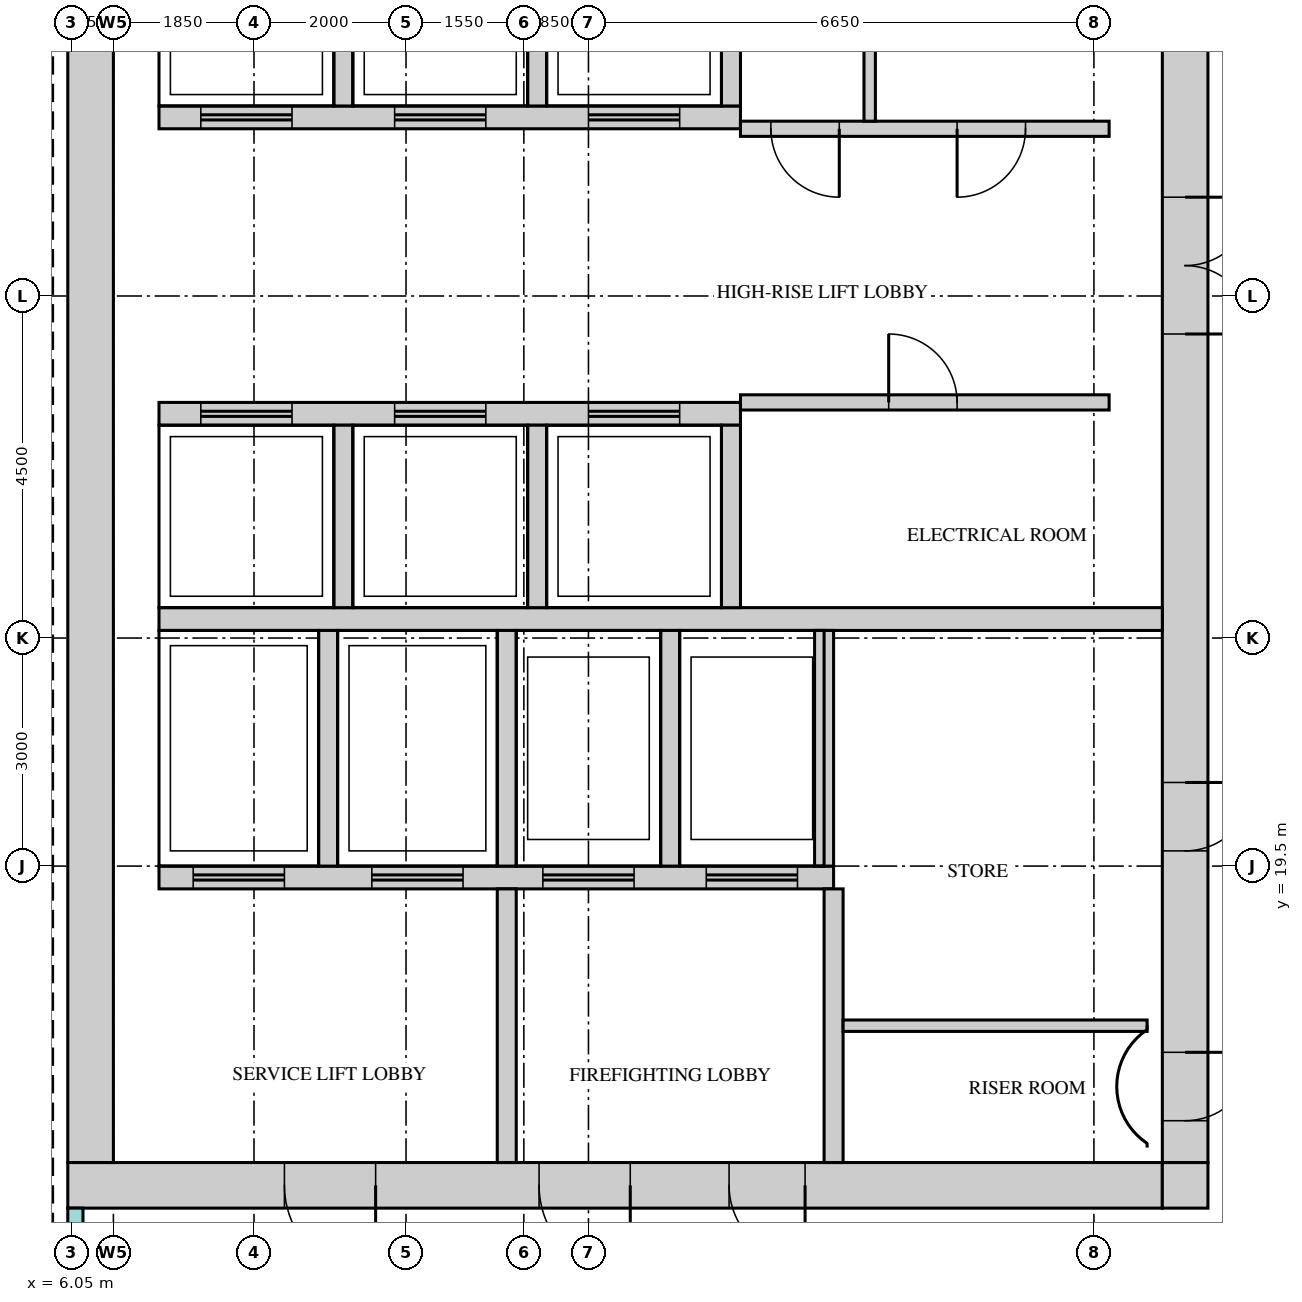
"""IFC4 building model, lengths in metres.
Left out: names, types, materials, properties, quantities, classifications, styles, units other than length and angle.
Written with IfcOpenShell. Run it as: python <this file> out.ifc"""

import sys

from ifc_helpers import new_model, si_unit, direction, frame, frame_2d, origin, place, context, subcontext, project, spatial, rectangle, extrude, source, transform, mapped, element, fill, save


model = new_model("IFC4")
c1 = context("Model", 3, precision=1e-05, world=origin(), true_north=direction((0.0, 1.0)))
c2 = subcontext(c1, "Body", "Model", "MODEL_VIEW")
j1 = project(units=[si_unit("LENGTHUNIT", "METRE"), si_unit("PLANEANGLEUNIT", "RADIAN")], contexts=[c1])
p1 = place(None, origin())
s1 = spatial("IfcSite", under=j1, at=p1, CompositionType="ELEMENT")
p2 = place(p1, origin())
s2 = spatial("IfcBuilding", under=s1, at=p2, CompositionType="ELEMENT")
p3 = place(p2, frame((0.0, 0.0, 322.2)))
s3 = spatial("IfcBuildingStorey", under=s2, at=p3, CompositionType="ELEMENT", Elevation=322.2)
m1 = source(origin(), c2, "Body", "SweptSolid", [
    extrude(rectangle(XDim=14.4, YDim=0.6, at=frame_2d((7.2, 0.0))), origin(), (0.0, 0.0, 1.0), 3.75),
])
p4 = place(p3, frame((6.0, 15.3, 0.0), z_axis=(0.0, 0.0, 1.0), x_axis=(1.0, 0.0, 0.0)))
e1 = element("IfcWall", 1, at=p4, inside=s3, PredefinedType="SHEAR", context=c2, shape_type="MappedRepresentation", body=[
    mapped(m1, transform((0.0, 0.0, 0.0))),
])
m2 = source(origin(), c2, "Body", "SweptSolid", [
    extrude(rectangle(XDim=1.2, YDim=2.1, at=frame_2d((0.6, 1.05))), frame((0.0, 0.31, 0.0), z_axis=(0.0, -1.0, 0.0), x_axis=(1.0, 0.0, 0.0)), (0.0, 0.0, 1.0), 0.62),
])
p5 = place(p4, frame((6.2, 0.0, 0.0)))
e2 = element("IfcOpeningElement", 2, at=p5, cuts=e1, PredefinedType="OPENING", context=c2, shape_type="MappedRepresentation", body=[
    mapped(m2, transform((0.0, 0.0, 0.0))),
])
p6 = place(p4, frame((2.85, 0.0, 0.0)))
e3 = element("IfcOpeningElement", 3, at=p6, cuts=e1, PredefinedType="OPENING", context=c2, shape_type="MappedRepresentation", body=[
    mapped(m2, transform((0.0, 0.0, 0.0))),
])
m3 = source(origin(), c2, "Body", "SweptSolid", [
    extrude(rectangle(XDim=1.0, YDim=2.1, at=frame_2d((0.5, 1.05))), frame((0.0, 0.31, 0.0), z_axis=(0.0, -1.0, 0.0), x_axis=(1.0, 0.0, 0.0)), (0.0, 0.0, 1.0), 0.62),
])
p7 = place(p4, frame((8.7, 0.0, 0.0)))
e4 = element("IfcOpeningElement", 4, at=p7, cuts=e1, PredefinedType="OPENING", context=c2, shape_type="MappedRepresentation", body=[
    mapped(m3, transform((0.0, 0.0, 0.0))),
])
m4 = source(origin(), c2, "Body", "SweptSolid", [
    extrude(rectangle(XDim=0.6, YDim=0.6, at=frame_2d((0.3, 0.0))), origin(), (0.0, 0.0, 1.0), 3.75),
])
p8 = place(p3, frame((20.4, 15.3, 0.0), z_axis=(0.0, 0.0, 1.0), x_axis=(1.0, 0.0, 0.0)))
e5 = element("IfcWall", 5, at=p8, inside=s3, PredefinedType="SHEAR", context=c2, shape_type="MappedRepresentation", body=[
    mapped(m4, transform((0.0, 0.0, 0.0))),
])
m5 = source(origin(), c2, "Body", "SweptSolid", [
    extrude(rectangle(XDim=22.8, YDim=0.6, at=frame_2d((11.4, 0.0))), origin(), (0.0, 0.0, 1.0), 3.75),
])
p9 = place(p3, frame((20.7, 15.6, 0.0), z_axis=(0.0, 0.0, 1.0), x_axis=(0.0, 1.0, 0.0)))
e6 = element("IfcWall", 6, at=p9, inside=s3, PredefinedType="SHEAR", context=c2, shape_type="MappedRepresentation", body=[
    mapped(m5, transform((0.0, 0.0, 0.0))),
])
m6 = source(origin(), c2, "Body", "SweptSolid", [
    extrude(rectangle(XDim=1.8, YDim=2.1, at=frame_2d((0.9, 1.05))), frame((0.0, 0.31, 0.0), z_axis=(0.0, -1.0, 0.0), x_axis=(1.0, 0.0, 0.0)), (0.0, 0.0, 1.0), 0.62),
])
p10 = place(p9, frame((10.9, 0.0, 0.0)))
e7 = element("IfcOpeningElement", 7, at=p10, cuts=e6, PredefinedType="OPENING", context=c2, shape_type="MappedRepresentation", body=[
    mapped(m6, transform((0.0, 0.0, 0.0))),
])
m7 = source(origin(), c2, "Body", "SweptSolid", [
    extrude(rectangle(XDim=0.9, YDim=2.1, at=frame_2d((0.45, 1.05))), frame((0.0, 0.31, 0.0), z_axis=(0.0, -1.0, 0.0), x_axis=(1.0, 0.0, 0.0)), (0.0, 0.0, 1.0), 0.62),
])
p11 = place(p9, frame((0.55, 0.0, 0.0)))
e8 = element("IfcOpeningElement", 8, at=p11, cuts=e6, PredefinedType="OPENING", context=c2, shape_type="MappedRepresentation", body=[
    mapped(m7, transform((0.0, 0.0, 0.0))),
])
p12 = place(p9, frame((4.1, 0.0, 0.0)))
e9 = element("IfcOpeningElement", 9, at=p12, cuts=e6, PredefinedType="OPENING", context=c2, shape_type="MappedRepresentation", body=[
    mapped(m7, transform((0.0, 0.0, 0.0))),
])
p13 = place(p3, frame((6.3, 15.6, 0.0), z_axis=(0.0, 0.0, 1.0), x_axis=(0.0, 1.0, 0.0)))
e10 = element("IfcWall", 10, at=p13, inside=s3, PredefinedType="SHEAR", context=c2, shape_type="MappedRepresentation", body=[
    mapped(m5, transform((0.0, 0.0, 0.0))),
])
m8 = source(origin(), c2, "Body", "SweptSolid", [
    extrude(rectangle(XDim=13.2, YDim=0.3, at=frame_2d((6.6, 0.0))), origin(), (0.0, 0.0, 1.0), 3.75),
])
p14 = place(p3, frame((7.2, 22.75, 0.0), z_axis=(0.0, 0.0, 1.0), x_axis=(1.0, 0.0, 0.0)))
e11 = element("IfcWall", 11, at=p14, inside=s3, PredefinedType="STANDARD", context=c2, shape_type="MappedRepresentation", body=[
    mapped(m8, transform((0.0, 0.0, 0.0))),
])
m9 = source(origin(), c2, "Body", "SweptSolid", [
    extrude(rectangle(XDim=8.875, YDim=0.3, at=frame_2d((4.438, 0.0))), origin(), (0.0, 0.0, 1.0), 3.75),
])
p15 = place(p3, frame((7.2, 19.35, 0.0), z_axis=(0.0, 0.0, 1.0), x_axis=(1.0, 0.0, 0.0)))
e12 = element("IfcWall", 12, at=p15, inside=s3, PredefinedType="STANDARD", context=c2, shape_type="MappedRepresentation", body=[
    mapped(m9, transform((0.0, 0.0, 0.0))),
])
m10 = source(origin(), c2, "Body", "SweptSolid", [
    extrude(rectangle(XDim=1.2, YDim=2.1, at=frame_2d((0.6, 1.05))), frame((0.0, 0.16, 0.0), z_axis=(0.0, -1.0, 0.0), x_axis=(1.0, 0.0, 0.0)), (0.0, 0.0, 1.0), 0.32),
])
p16 = place(p15, frame((0.45, 0.0, 0.0)))
e13 = element("IfcOpeningElement", 13, at=p16, cuts=e12, PredefinedType="OPENING", context=c2, shape_type="MappedRepresentation", body=[
    mapped(m10, transform((0.0, 0.0, 0.0))),
])
p17 = place(p15, frame((2.8, 0.0, 0.0)))
e14 = element("IfcOpeningElement", 14, at=p17, cuts=e12, PredefinedType="OPENING", context=c2, shape_type="MappedRepresentation", body=[
    mapped(m10, transform((0.0, 0.0, 0.0))),
])
p18 = place(p15, frame((5.05, 0.0, 0.0)))
e15 = element("IfcOpeningElement", 15, at=p18, cuts=e12, PredefinedType="OPENING", context=c2, shape_type="MappedRepresentation", body=[
    mapped(m10, transform((0.0, 0.0, 0.0))),
])
p19 = place(p15, frame((7.2, 0.0, 0.0)))
e16 = element("IfcOpeningElement", 16, at=p19, cuts=e12, PredefinedType="OPENING", context=c2, shape_type="MappedRepresentation", body=[
    mapped(m10, transform((0.0, 0.0, 0.0))),
])
m11 = source(origin(), c2, "Body", "SweptSolid", [
    extrude(rectangle(XDim=7.65, YDim=0.3, at=frame_2d((3.825, 0.0))), origin(), (0.0, 0.0, 1.0), 3.75),
])
p20 = place(p3, frame((7.2, 29.35, 0.0), z_axis=(0.0, 0.0, 1.0), x_axis=(1.0, 0.0, 0.0)))
e17 = element("IfcWall", 17, at=p20, inside=s3, PredefinedType="STANDARD", context=c2, shape_type="MappedRepresentation", body=[
    mapped(m11, transform((0.0, 0.0, 0.0))),
])
p21 = place(p20, frame((0.55, 0.0, 0.0)))
e18 = element("IfcOpeningElement", 18, at=p21, cuts=e17, PredefinedType="OPENING", context=c2, shape_type="MappedRepresentation", body=[
    mapped(m10, transform((0.0, 0.0, 0.0))),
])
p22 = place(p20, frame((3.1, 0.0, 0.0)))
e19 = element("IfcOpeningElement", 19, at=p22, cuts=e17, PredefinedType="OPENING", context=c2, shape_type="MappedRepresentation", body=[
    mapped(m10, transform((0.0, 0.0, 0.0))),
])
p23 = place(p20, frame((5.65, 0.0, 0.0)))
e20 = element("IfcOpeningElement", 20, at=p23, cuts=e17, PredefinedType="OPENING", context=c2, shape_type="MappedRepresentation", body=[
    mapped(m10, transform((0.0, 0.0, 0.0))),
])
p24 = place(p3, frame((7.2, 25.45, 0.0), z_axis=(0.0, 0.0, 1.0), x_axis=(1.0, 0.0, 0.0)))
e21 = element("IfcWall", 21, at=p24, inside=s3, PredefinedType="STANDARD", context=c2, shape_type="MappedRepresentation", body=[
    mapped(m11, transform((0.0, 0.0, 0.0))),
])
p25 = place(p24, frame((0.55, 0.0, 0.0)))
e22 = element("IfcOpeningElement", 22, at=p25, cuts=e21, PredefinedType="OPENING", context=c2, shape_type="MappedRepresentation", body=[
    mapped(m10, transform((0.0, 0.0, 0.0))),
])
p26 = place(p24, frame((3.1, 0.0, 0.0)))
e23 = element("IfcOpeningElement", 23, at=p26, cuts=e21, PredefinedType="OPENING", context=c2, shape_type="MappedRepresentation", body=[
    mapped(m10, transform((0.0, 0.0, 0.0))),
])
p27 = place(p24, frame((5.65, 0.0, 0.0)))
e24 = element("IfcOpeningElement", 24, at=p27, cuts=e21, PredefinedType="OPENING", context=c2, shape_type="MappedRepresentation", body=[
    mapped(m10, transform((0.0, 0.0, 0.0))),
])
m12 = source(origin(), c2, "Body", "SweptSolid", [
    extrude(rectangle(XDim=3.1, YDim=0.25, at=frame_2d((1.55, 0.0))), origin(), (0.0, 0.0, 1.0), 3.75),
])
for number, where, z_axis, x_axis in (
    (25, (9.425, 19.5, 0.0), (0.0, 0.0, 1.0), (0.0, 1.0, 0.0)),
    (26, (11.775, 19.5, 0.0), (0.0, 0.0, 1.0), (0.0, 1.0, 0.0)),
    (27, (13.925, 19.5, 0.0), (0.0, 0.0, 1.0), (0.0, 1.0, 0.0)),
    (28, (15.95, 19.5, 0.0), (0.0, 0.0, 1.0), (0.0, 1.0, 0.0)),
):
    element("IfcWall", number, at=place(p3, frame(where, z_axis=z_axis, x_axis=x_axis)), inside=s3, PredefinedType="STANDARD", context=c2, shape_type="MappedRepresentation", body=[
        mapped(m12, transform((0.0, 0.0, 0.0))),
    ])
m13 = source(origin(), c2, "Body", "SweptSolid", [
    extrude(rectangle(XDim=2.4, YDim=0.25, at=frame_2d((1.2, 0.0))), origin(), (0.0, 0.0, 1.0), 3.75),
])
for number, where, z_axis, x_axis in (
    (29, (9.625, 29.5, 0.0), (0.0, 0.0, 1.0), (0.0, 1.0, 0.0)),
    (30, (12.175, 29.5, 0.0), (0.0, 0.0, 1.0), (0.0, 1.0, 0.0)),
    (31, (14.725, 29.5, 0.0), (0.0, 0.0, 1.0), (0.0, 1.0, 0.0)),
):
    element("IfcWall", number, at=place(p3, frame(where, z_axis=z_axis, x_axis=x_axis)), inside=s3, PredefinedType="STANDARD", context=c2, shape_type="MappedRepresentation", body=[
        mapped(m13, transform((0.0, 0.0, 0.0))),
    ])
m14 = source(origin(), c2, "Body", "SweptSolid", [
    extrude(rectangle(XDim=2.4, YDim=0.25, at=frame_2d((1.2, 0.0))), origin(), (0.0, 0.0, 1.0), 3.75),
])
for number, where, z_axis, x_axis in (
    (32, (9.625, 22.9, 0.0), (0.0, 0.0, 1.0), (0.0, 1.0, 0.0)),
    (33, (12.175, 22.9, 0.0), (0.0, 0.0, 1.0), (0.0, 1.0, 0.0)),
    (34, (14.725, 22.9, 0.0), (0.0, 0.0, 1.0), (0.0, 1.0, 0.0)),
):
    element("IfcWall", number, at=place(p3, frame(where, z_axis=z_axis, x_axis=x_axis)), inside=s3, PredefinedType="STANDARD", context=c2, shape_type="MappedRepresentation", body=[
        mapped(m14, transform((0.0, 0.0, 0.0))),
    ])
m15 = source(origin(), c2, "Body", "SweptSolid", [
    extrude(rectangle(XDim=3.6, YDim=0.25, at=frame_2d((1.8, 0.0))), origin(), (0.0, 0.0, 1.0), 3.75),
])
for number, where, z_axis, x_axis in (
    (35, (16.075, 15.6, 0.0), (0.0, 0.0, 1.0), (0.0, 1.0, 0.0)),
    (36, (11.775, 15.6, 0.0), (0.0, 0.0, 1.0), (0.0, 1.0, 0.0)),
):
    element("IfcWall", number, at=place(p3, frame(where, z_axis=z_axis, x_axis=x_axis)), inside=s3, PredefinedType="STANDARD", context=c2, shape_type="MappedRepresentation", body=[
        mapped(m15, transform((0.0, 0.0, 0.0))),
    ])
m16 = source(origin(), c2, "Body", "SweptSolid", [
    extrude(rectangle(XDim=4.0, YDim=0.15, at=frame_2d((2.0, 0.0))), origin(), (0.0, 0.0, 1.0), 3.8),
])
p28 = place(p3, frame((16.2, 17.4, 0.0), z_axis=(0.0, 0.0, 1.0), x_axis=(1.0, 0.0, 0.0)))
e37 = element("IfcWall", 37, at=p28, inside=s3, PredefinedType="PARTITIONING", context=c2, shape_type="MappedRepresentation", body=[
    mapped(m16, transform((0.0, 0.0, 0.0))),
])
m17 = source(origin(), c2, "Body", "SweptSolid", [
    extrude(rectangle(XDim=4.85, YDim=0.2, at=frame_2d((2.425, 0.0))), origin(), (0.0, 0.0, 1.0), 3.8),
])
p29 = place(p3, frame((14.85, 25.6, 0.0), z_axis=(0.0, 0.0, 1.0), x_axis=(1.0, 0.0, 0.0)))
e38 = element("IfcWall", 38, at=p29, inside=s3, PredefinedType="PARTITIONING", context=c2, shape_type="MappedRepresentation", body=[
    mapped(m17, transform((0.0, 0.0, 0.0))),
])
m18 = source(origin(), c2, "Body", "SweptSolid", [
    extrude(rectangle(XDim=0.9, YDim=2.1, at=frame_2d((0.45, 1.05))), frame((0.0, 0.11, 0.0), z_axis=(0.0, -1.0, 0.0), x_axis=(1.0, 0.0, 0.0)), (0.0, 0.0, 1.0), 0.22),
])
p30 = place(p29, frame((1.95, 0.0, 0.0)))
e39 = element("IfcOpeningElement", 39, at=p30, cuts=e38, PredefinedType="OPENING", context=c2, shape_type="MappedRepresentation", body=[
    mapped(m18, transform((0.0, 0.0, 0.0))),
])
p31 = place(p3, frame((14.85, 29.2, 0.0), z_axis=(0.0, 0.0, 1.0), x_axis=(1.0, 0.0, 0.0)))
e40 = element("IfcWall", 40, at=p31, inside=s3, PredefinedType="PARTITIONING", context=c2, shape_type="MappedRepresentation", body=[
    mapped(m17, transform((0.0, 0.0, 0.0))),
])
p32 = place(p31, frame((0.4, 0.0, 0.0)))
e41 = element("IfcOpeningElement", 41, at=p32, cuts=e40, PredefinedType="OPENING", context=c2, shape_type="MappedRepresentation", body=[
    mapped(m18, transform((0.0, 0.0, 0.0))),
])
p33 = place(p31, frame((2.85, 0.0, 0.0)))
e42 = element("IfcOpeningElement", 42, at=p33, cuts=e40, PredefinedType="OPENING", context=c2, shape_type="MappedRepresentation", body=[
    mapped(m18, transform((0.0, 0.0, 0.0))),
])
m19 = source(origin(), c2, "Body", "SweptSolid", [
    extrude(rectangle(XDim=2.8, YDim=0.15, at=frame_2d((1.4, 0.0))), origin(), (0.0, 0.0, 1.0), 3.8),
])
p34 = place(p3, frame((16.55, 29.3, 0.0), z_axis=(0.0, 0.0, 1.0), x_axis=(0.0, 1.0, 0.0)))
e43 = element("IfcWall", 43, at=p34, inside=s3, PredefinedType="PARTITIONING", context=c2, shape_type="MappedRepresentation", body=[
    mapped(m19, transform((0.0, 0.0, 0.0))),
])
m20 = source(origin(), c2, "Body", "SweptSolid", [
    extrude(rectangle(XDim=0.9, YDim=2.1, at=frame_2d((0.45, 1.05))), frame((0.0, 0.025, 0.0), z_axis=(0.0, -1.0, 0.0), x_axis=(1.0, 0.0, 0.0)), (0.0, 0.0, 1.0), 0.05),
])
p35 = place(p30, origin())
e44 = element("IfcDoor", 44, at=p35, inside=s3, OperationType="SINGLE_SWING_RIGHT", PredefinedType="DOOR", context=c2, shape_type="MappedRepresentation", body=[
    mapped(m20, transform((0.0, 0.0, 0.0))),
])
fill(e39, e44)
p36 = place(p32, origin())
e45 = element("IfcDoor", 45, at=p36, inside=s3, OperationType="SINGLE_SWING_RIGHT", PredefinedType="DOOR", context=c2, shape_type="MappedRepresentation", body=[
    mapped(m20, transform((0.0, 0.0, 0.0))),
])
fill(e41, e45)
p37 = place(p33, origin())
e46 = element("IfcDoor", 46, at=p37, inside=s3, OperationType="SINGLE_SWING_LEFT", PredefinedType="DOOR", context=c2, shape_type="MappedRepresentation", body=[
    mapped(m20, transform((0.0, 0.0, 0.0))),
])
fill(e42, e46)
m21 = source(origin(), c2, "Body", "SweptSolid", [
    extrude(rectangle(XDim=1.8, YDim=2.1, at=frame_2d((0.9, 1.05))), frame((0.0, 0.25, 0.0), z_axis=(0.0, -1.0, 0.0), x_axis=(1.0, 0.0, 0.0)), (0.0, 0.0, 1.0), 0.5),
])
p38 = place(p10, origin())
e47 = element("IfcDoor", 47, at=p38, inside=s3, OperationType="DOUBLE_DOOR_SINGLE_SWING", PredefinedType="DOOR", context=c2, shape_type="MappedRepresentation", body=[
    mapped(m21, transform((0.0, 0.0, 0.0))),
])
fill(e7, e47)
m22 = source(origin(), c2, "Body", "SweptSolid", [
    extrude(rectangle(XDim=0.9, YDim=2.1, at=frame_2d((0.45, 1.05))), frame((0.0, 0.25, 0.0), z_axis=(0.0, -1.0, 0.0), x_axis=(1.0, 0.0, 0.0)), (0.0, 0.0, 1.0), 0.5),
])
p39 = place(p11, origin())
e48 = element("IfcDoor", 48, at=p39, inside=s3, OperationType="SINGLE_SWING_RIGHT", PredefinedType="DOOR", context=c2, shape_type="MappedRepresentation", body=[
    mapped(m22, transform((0.0, 0.0, 0.0))),
])
fill(e8, e48)
p40 = place(p12, origin())
e49 = element("IfcDoor", 49, at=p40, inside=s3, OperationType="SINGLE_SWING_RIGHT", PredefinedType="DOOR", context=c2, shape_type="MappedRepresentation", body=[
    mapped(m22, transform((0.0, 0.0, 0.0))),
])
fill(e9, e49)
m23 = source(origin(), c2, "Body", "SweptSolid", [
    extrude(rectangle(XDim=1.2, YDim=2.1, at=frame_2d((0.6, 1.05))), frame((0.0, 0.25, 0.0), z_axis=(0.0, -1.0, 0.0), x_axis=(1.0, 0.0, 0.0)), (0.0, 0.0, 1.0), 0.5),
])
p41 = place(p5, origin())
e50 = element("IfcDoor", 50, at=p41, inside=s3, OperationType="SINGLE_SWING_RIGHT", PredefinedType="DOOR", context=c2, shape_type="MappedRepresentation", body=[
    mapped(m23, transform((0.0, 0.0, 0.0))),
])
fill(e2, e50)
p42 = place(p6, origin())
e51 = element("IfcDoor", 51, at=p42, inside=s3, OperationType="SINGLE_SWING_RIGHT", PredefinedType="DOOR", context=c2, shape_type="MappedRepresentation", body=[
    mapped(m23, transform((0.0, 0.0, 0.0))),
])
fill(e3, e51)
m24 = source(origin(), c2, "Body", "SweptSolid", [
    extrude(rectangle(XDim=1.0, YDim=2.1, at=frame_2d((0.5, 1.05))), frame((0.0, 0.25, 0.0), z_axis=(0.0, -1.0, 0.0), x_axis=(1.0, 0.0, 0.0)), (0.0, 0.0, 1.0), 0.5),
])
p43 = place(p7, origin())
e52 = element("IfcDoor", 52, at=p43, inside=s3, OperationType="SINGLE_SWING_RIGHT", PredefinedType="DOOR", context=c2, shape_type="MappedRepresentation", body=[
    mapped(m24, transform((0.0, 0.0, 0.0))),
])
fill(e4, e52)
m25 = source(origin(), c2, "Body", "SweptSolid", [
    extrude(rectangle(XDim=1.2, YDim=2.1, at=frame_2d((0.6, 1.05))), frame((0.0, 0.025, 0.0), z_axis=(0.0, -1.0, 0.0), x_axis=(1.0, 0.0, 0.0)), (0.0, 0.0, 1.0), 0.05),
])
p44 = place(p25, origin())
e53 = element("IfcDoor", 53, at=p44, inside=s3, OperationType="DOUBLE_DOOR_SLIDING", PredefinedType="DOOR", context=c2, shape_type="MappedRepresentation", body=[
    mapped(m25, transform((0.0, 0.0, 0.0))),
])
fill(e22, e53)
p45 = place(p26, origin())
e54 = element("IfcDoor", 54, at=p45, inside=s3, OperationType="DOUBLE_DOOR_SLIDING", PredefinedType="DOOR", context=c2, shape_type="MappedRepresentation", body=[
    mapped(m25, transform((0.0, 0.0, 0.0))),
])
fill(e23, e54)
p46 = place(p27, origin())
e55 = element("IfcDoor", 55, at=p46, inside=s3, OperationType="DOUBLE_DOOR_SLIDING", PredefinedType="DOOR", context=c2, shape_type="MappedRepresentation", body=[
    mapped(m25, transform((0.0, 0.0, 0.0))),
])
fill(e24, e55)
p47 = place(p21, origin())
e56 = element("IfcDoor", 56, at=p47, inside=s3, OperationType="DOUBLE_DOOR_SLIDING", PredefinedType="DOOR", context=c2, shape_type="MappedRepresentation", body=[
    mapped(m25, transform((0.0, 0.0, 0.0))),
])
fill(e18, e56)
p48 = place(p22, origin())
e57 = element("IfcDoor", 57, at=p48, inside=s3, OperationType="DOUBLE_DOOR_SLIDING", PredefinedType="DOOR", context=c2, shape_type="MappedRepresentation", body=[
    mapped(m25, transform((0.0, 0.0, 0.0))),
])
fill(e19, e57)
p49 = place(p23, origin())
e58 = element("IfcDoor", 58, at=p49, inside=s3, OperationType="DOUBLE_DOOR_SLIDING", PredefinedType="DOOR", context=c2, shape_type="MappedRepresentation", body=[
    mapped(m25, transform((0.0, 0.0, 0.0))),
])
fill(e20, e58)
p50 = place(p16, origin())
e59 = element("IfcDoor", 59, at=p50, inside=s3, OperationType="DOUBLE_DOOR_SLIDING", PredefinedType="DOOR", context=c2, shape_type="MappedRepresentation", body=[
    mapped(m25, transform((0.0, 0.0, 0.0))),
])
fill(e13, e59)
p51 = place(p17, origin())
e60 = element("IfcDoor", 60, at=p51, inside=s3, OperationType="DOUBLE_DOOR_SLIDING", PredefinedType="DOOR", context=c2, shape_type="MappedRepresentation", body=[
    mapped(m25, transform((0.0, 0.0, 0.0))),
])
fill(e14, e60)
p52 = place(p18, origin())
e61 = element("IfcDoor", 61, at=p52, inside=s3, OperationType="DOUBLE_DOOR_SLIDING", PredefinedType="DOOR", context=c2, shape_type="MappedRepresentation", body=[
    mapped(m25, transform((0.0, 0.0, 0.0))),
])
fill(e15, e61)
p53 = place(p19, origin())
e62 = element("IfcDoor", 62, at=p53, inside=s3, OperationType="DOUBLE_DOOR_SLIDING", PredefinedType="DOOR", context=c2, shape_type="MappedRepresentation", body=[
    mapped(m25, transform((0.0, 0.0, 0.0))),
])
fill(e16, e62)
save(model, sys.argv[1])
